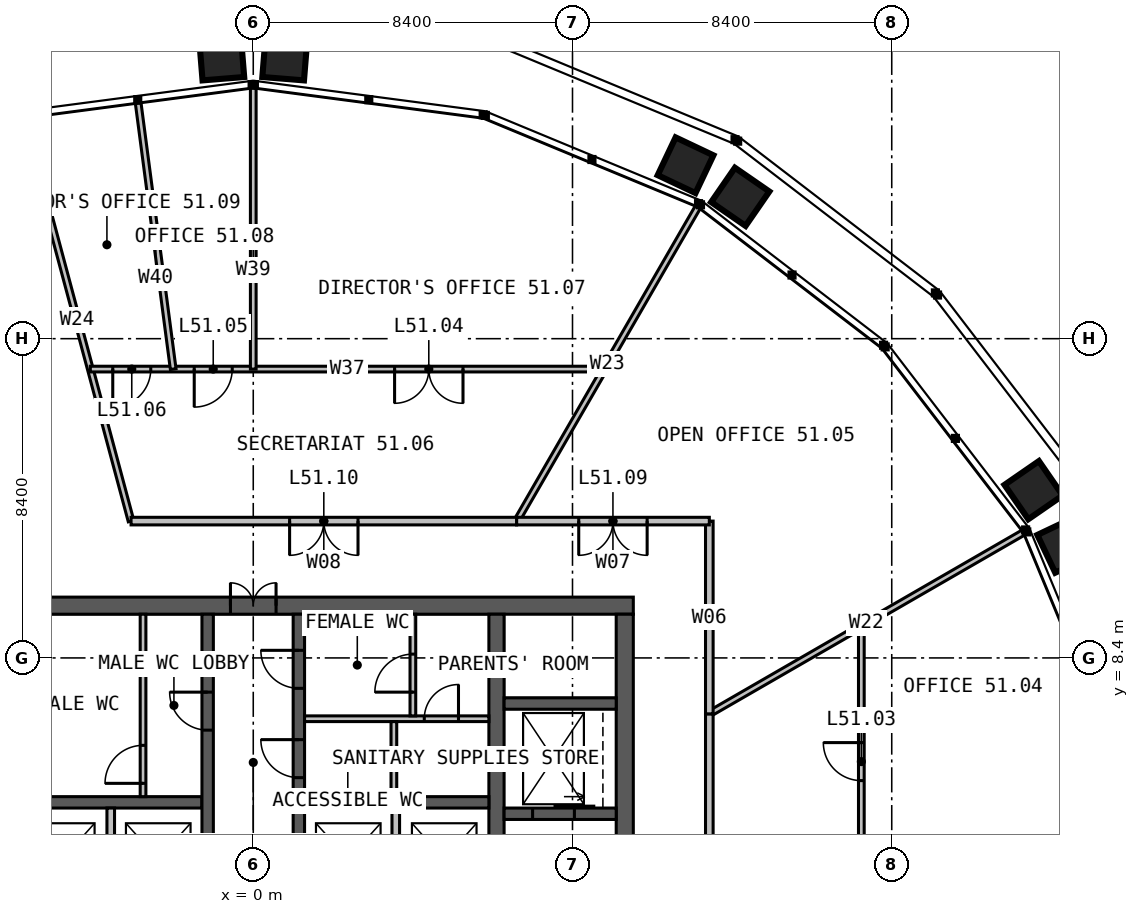
"""IFC4 building model, lengths in metres.
Left out: names, types, materials, properties, quantities, classifications, styles, units other than length and angle.
Written with IfcOpenShell. Run it as: python <this file> out.ifc"""

import sys

from ifc_helpers import new_model, si_unit, direction, frame, frame_2d, origin, place, context, subcontext, project, spatial, rectangle, extrude, element, fill, save


model = new_model("IFC4")
c1 = context("Model", 3, precision=1e-05, world=origin(), true_north=direction((0.0, 1.0)))
c2 = subcontext(c1, "Body", "Model", "MODEL_VIEW")
j1 = project(units=[si_unit("LENGTHUNIT", "METRE"), si_unit("PLANEANGLEUNIT", "RADIAN")], contexts=[c1])
p1 = place(None, origin())
s1 = spatial("IfcSite", under=j1, at=p1, CompositionType="ELEMENT")
p2 = place(p1, origin())
s2 = spatial("IfcBuilding", under=s1, at=p2, CompositionType="ELEMENT")
p3 = place(p2, frame((0.0, 0.0, 211.0)))
s3 = spatial("IfcBuildingStorey", under=s2, at=p3, CompositionType="ELEMENT", Elevation=211.0)
p4 = place(p3, frame((-10.0, 9.775, 0.0), z_axis=(0.0, 0.0, 1.0), x_axis=(1.0, 0.0, 0.0)))
e1 = element("IfcWall", 1, at=p4, inside=s3, PredefinedType="SOLIDWALL", context=c2, shape_type="SweptSolid", body=[
    extrude(rectangle(XDim=20.0, YDim=0.45, at=frame_2d((10.0, 0.0))), origin(), (0.0, 0.0, 1.0), 4.0),
])
p5 = place(p4, frame((9.4, 0.0, 0.0)))
e2 = element("IfcOpeningElement", 2, at=p5, cuts=e1, PredefinedType="OPENING", context=c2, shape_type="SweptSolid", body=[
    extrude(rectangle(XDim=1.2, YDim=2.2, at=frame_2d((0.6, 1.1))), frame((0.0, 0.235, 0.0), z_axis=(0.0, -1.0, 0.0), x_axis=(1.0, 0.0, 0.0)), (0.0, 0.0, 1.0), 0.47),
])
p6 = place(p3, frame((9.775, -9.55, 0.0), z_axis=(0.0, 0.0, 1.0), x_axis=(0.0, 1.0, 0.0)))
e3 = element("IfcWall", 3, at=p6, inside=s3, PredefinedType="SOLIDWALL", context=c2, shape_type="SweptSolid", body=[
    extrude(rectangle(XDim=19.1, YDim=0.45, at=frame_2d((9.55, 0.0))), origin(), (0.0, 0.0, 1.0), 4.0),
])
p7 = place(p3, frame((6.4, 9.55, 0.0), z_axis=(0.0, 0.0, 1.0), x_axis=(0.0, -1.0, 0.0)))
e4 = element("IfcWall", 4, at=p7, inside=s3, PredefinedType="SOLIDWALL", context=c2, shape_type="SweptSolid", body=[
    extrude(rectangle(XDim=19.1, YDim=0.4, at=frame_2d((9.55, 0.0))), origin(), (0.0, 0.0, 1.0), 4.0),
])
p8 = place(p7, frame((9.05, 0.0, 0.0)))
e5 = element("IfcOpeningElement", 5, at=p8, cuts=e4, PredefinedType="OPENING", context=c2, shape_type="SweptSolid", body=[
    extrude(rectangle(XDim=1.0, YDim=2.2, at=frame_2d((0.5, 1.1))), frame((0.0, 0.21, 0.0), z_axis=(0.0, -1.0, 0.0), x_axis=(1.0, 0.0, 0.0)), (0.0, 0.0, 1.0), 0.42),
])
for number, where, z_axis, x_axis in (
    (6, (-6.2, 4.6, 0.0), (0.0, 0.0, 1.0), (1.0, 0.0, 0.0)),
    (7, (1.35, 4.6, 0.0), (0.0, 0.0, 1.0), (1.0, 0.0, 0.0)),
):
    element("IfcWall", number, at=place(p3, frame(where, z_axis=z_axis, x_axis=x_axis)), inside=s3, PredefinedType="SOLIDWALL", context=c2, shape_type="SweptSolid", body=[
        extrude(rectangle(XDim=4.85, YDim=0.3, at=frame_2d((2.425, 0.0))), origin(), (0.0, 0.0, 1.0), 4.0),
    ])
p9 = place(p3, frame((-1.2, 1.45, 0.0), z_axis=(0.0, 0.0, 1.0), x_axis=(0.0, 1.0, 0.0)))
e8 = element("IfcWall", 8, at=p9, inside=s3, PredefinedType="SOLIDWALL", context=c2, shape_type="SweptSolid", body=[
    extrude(rectangle(XDim=8.1, YDim=0.3, at=frame_2d((4.05, 0.0))), origin(), (0.0, 0.0, 1.0), 4.0),
])
p10 = place(p9, frame((5.05, 0.0, 0.0)))
e9 = element("IfcOpeningElement", 9, at=p10, cuts=e8, PredefinedType="OPENING", context=c2, shape_type="SweptSolid", body=[
    extrude(rectangle(XDim=1.0, YDim=2.2, at=frame_2d((0.5, 1.1))), frame((0.0, 0.16, 0.0), z_axis=(0.0, -1.0, 0.0), x_axis=(1.0, 0.0, 0.0)), (0.0, 0.0, 1.0), 0.32),
])
p11 = place(p3, frame((1.2, 1.45, 0.0), z_axis=(0.0, 0.0, 1.0), x_axis=(0.0, 1.0, 0.0)))
e10 = element("IfcWall", 10, at=p11, inside=s3, PredefinedType="SOLIDWALL", context=c2, shape_type="SweptSolid", body=[
    extrude(rectangle(XDim=8.1, YDim=0.3, at=frame_2d((4.05, 0.0))), origin(), (0.0, 0.0, 1.0), 4.0),
])
p12 = place(p11, frame((3.8, 0.0, 0.0)))
e11 = element("IfcOpeningElement", 11, at=p12, cuts=e10, PredefinedType="OPENING", context=c2, shape_type="SweptSolid", body=[
    extrude(rectangle(XDim=1.0, YDim=2.2, at=frame_2d((0.5, 1.1))), frame((0.0, 0.16, 0.0), z_axis=(0.0, -1.0, 0.0), x_axis=(1.0, 0.0, 0.0)), (0.0, 0.0, 1.0), 0.32),
])
p13 = place(p11, frame((6.15, 0.0, 0.0)))
e12 = element("IfcOpeningElement", 12, at=p13, cuts=e10, PredefinedType="OPENING", context=c2, shape_type="SweptSolid", body=[
    extrude(rectangle(XDim=1.0, YDim=2.2, at=frame_2d((0.5, 1.1))), frame((0.0, 0.16, 0.0), z_axis=(0.0, -1.0, 0.0), x_axis=(1.0, 0.0, 0.0)), (0.0, 0.0, 1.0), 0.32),
])
p14 = place(p3, frame((6.6, 4.3, 0.0), z_axis=(0.0, 0.0, 1.0), x_axis=(1.0, 0.0, 0.0)))
e13 = element("IfcWall", 13, at=p14, inside=s3, PredefinedType="SOLIDWALL", context=c2, shape_type="SweptSolid", body=[
    extrude(rectangle(XDim=2.95, YDim=0.3, at=frame_2d((1.475, 0.0))), origin(), (0.0, 0.0, 1.0), 4.0),
])
p15 = place(p14, frame((0.75, 0.0, 0.0)))
e14 = element("IfcOpeningElement", 14, at=p15, cuts=e13, PredefinedType="OPENING", context=c2, shape_type="SweptSolid", body=[
    extrude(rectangle(XDim=1.1, YDim=2.2, at=frame_2d((0.55, 1.1))), frame((0.0, 0.16, 0.0), z_axis=(0.0, -1.0, 0.0), x_axis=(1.0, 0.0, 0.0)), (0.0, 0.0, 1.0), 0.32),
])
p16 = place(p3, frame((6.6, 7.2, 0.0), z_axis=(0.0, 0.0, 1.0), x_axis=(1.0, 0.0, 0.0)))
e15 = element("IfcWall", 15, at=p16, inside=s3, PredefinedType="SOLIDWALL", context=c2, shape_type="SweptSolid", body=[
    extrude(rectangle(XDim=2.95, YDim=0.3, at=frame_2d((1.475, 0.0))), origin(), (0.0, 0.0, 1.0), 4.0),
])
for number, where, z_axis, x_axis in (
    (16, (-3.75, 1.75, 0.0), (0.0, 0.0, 1.0), (0.0, 1.0, 0.0)),
    (17, (3.75, 1.75, 0.0), (0.0, 0.0, 1.0), (0.0, 1.0, 0.0)),
):
    element("IfcWall", number, at=place(p3, frame(where, z_axis=z_axis, x_axis=x_axis)), inside=s3, PredefinedType="SOLIDWALL", context=c2, shape_type="SweptSolid", body=[
        extrude(rectangle(XDim=2.7, YDim=0.2, at=frame_2d((1.35, 0.0))), origin(), (0.0, 0.0, 1.0), 3.75),
    ])
p17 = place(p3, frame((1.35, 6.8, 0.0), z_axis=(0.0, 0.0, 1.0), x_axis=(1.0, 0.0, 0.0)))
e18 = element("IfcWall", 18, at=p17, inside=s3, PredefinedType="PARTITIONING", context=c2, shape_type="SweptSolid", body=[
    extrude(rectangle(XDim=4.85, YDim=0.15, at=frame_2d((2.425, 0.0))), origin(), (0.0, 0.0, 1.0), 3.75),
])
p18 = place(p17, frame((3.15, 0.0, 0.0)))
e19 = element("IfcOpeningElement", 19, at=p18, cuts=e18, PredefinedType="OPENING", context=c2, shape_type="SweptSolid", body=[
    extrude(rectangle(XDim=0.9, YDim=2.2, at=frame_2d((0.45, 1.1))), frame((0.0, 0.085, 0.0), z_axis=(0.0, -1.0, 0.0), x_axis=(1.0, 0.0, 0.0)), (0.0, 0.0, 1.0), 0.17),
])
p19 = place(p3, frame((3.7, 4.75, 0.0), z_axis=(0.0, 0.0, 1.0), x_axis=(0.0, 1.0, 0.0)))
e20 = element("IfcWall", 20, at=p19, inside=s3, PredefinedType="PARTITIONING", context=c2, shape_type="SweptSolid", body=[
    extrude(rectangle(XDim=1.975, YDim=0.15, at=frame_2d((0.988, 0.0))), origin(), (0.0, 0.0, 1.0), 3.75),
])
p20 = place(p3, frame((4.2, 6.875, 0.0), z_axis=(0.0, 0.0, 1.0), x_axis=(0.0, 1.0, 0.0)))
e21 = element("IfcWall", 21, at=p20, inside=s3, PredefinedType="PARTITIONING", context=c2, shape_type="SweptSolid", body=[
    extrude(rectangle(XDim=2.675, YDim=0.15, at=frame_2d((1.337, 0.0))), origin(), (0.0, 0.0, 1.0), 3.75),
])
p21 = place(p20, frame((0.625, 0.0, 0.0)))
e22 = element("IfcOpeningElement", 22, at=p21, cuts=e21, PredefinedType="OPENING", context=c2, shape_type="SweptSolid", body=[
    extrude(rectangle(XDim=1.0, YDim=2.2, at=frame_2d((0.5, 1.1))), frame((0.0, 0.085, 0.0), z_axis=(0.0, -1.0, 0.0), x_axis=(1.0, 0.0, 0.0)), (0.0, 0.0, 1.0), 0.17),
])
p22 = place(p3, frame((-2.9, 4.75, 0.0), z_axis=(0.0, 0.0, 1.0), x_axis=(0.0, 1.0, 0.0)))
e23 = element("IfcWall", 23, at=p22, inside=s3, PredefinedType="PARTITIONING", context=c2, shape_type="SweptSolid", body=[
    extrude(rectangle(XDim=4.8, YDim=0.15, at=frame_2d((2.4, 0.0))), origin(), (0.0, 0.0, 1.0), 3.75),
])
p23 = place(p22, frame((0.35, 0.0, 0.0)))
e24 = element("IfcOpeningElement", 24, at=p23, cuts=e23, PredefinedType="OPENING", context=c2, shape_type="SweptSolid", body=[
    extrude(rectangle(XDim=1.0, YDim=2.2, at=frame_2d((0.5, 1.1))), frame((0.0, 0.085, 0.0), z_axis=(0.0, -1.0, 0.0), x_axis=(1.0, 0.0, 0.0)), (0.0, 0.0, 1.0), 0.17),
])
for number, where, z_axis, x_axis in (
    (25, (12.0, 6.928, 0.0), (0.0, 0.0, 1.0), (0.866, 0.5, 0.0)),
    (26, (6.928, 12.0, 0.0), (0.0, 0.0, 1.0), (0.5, 0.866, 0.0)),
):
    element("IfcWall", number, at=place(p3, frame(where, z_axis=z_axis, x_axis=x_axis)), inside=s3, PredefinedType="PARTITIONING", context=c2, shape_type="SweptSolid", body=[
        extrude(rectangle(XDim=9.541, YDim=0.15, at=frame_2d((4.771, 0.0))), origin(), (0.0, 0.0, 1.0), 2.79),
    ])
p24 = place(p3, frame((-3.215, 12.0, 0.0), z_axis=(0.0, 0.0, 1.0), x_axis=(-0.258822822076, 0.965924814244, 0.0)))
e27 = element("IfcWall", 27, at=p24, inside=s3, PredefinedType="PARTITIONING", context=c2, shape_type="SweptSolid", body=[
    extrude(rectangle(XDim=10.974, YDim=0.15, at=frame_2d((5.487, 0.0))), origin(), (0.0, 0.0, 1.0), 2.79),
])
p25 = place(p3, frame((16.0, -9.238, 0.0), z_axis=(0.0, 0.0, 1.0), x_axis=(0.0, 1.0, 0.0)))
e28 = element("IfcWall", 28, at=p25, inside=s3, PredefinedType="PARTITIONING", context=c2, shape_type="SweptSolid", body=[
    extrude(rectangle(XDim=18.475, YDim=0.15, at=frame_2d((9.238, 0.0))), origin(), (0.0, 0.0, 1.0), 2.79),
])
p26 = place(p25, frame((1.975, 0.0, 0.0)))
e29 = element("IfcOpeningElement", 29, at=p26, cuts=e28, PredefinedType="OPENING", context=c2, shape_type="SweptSolid", body=[
    extrude(rectangle(XDim=1.0, YDim=2.2, at=frame_2d((0.5, 1.1))), frame((0.0, 0.085, 0.0), z_axis=(0.0, -1.0, 0.0), x_axis=(1.0, 0.0, 0.0)), (0.0, 0.0, 1.0), 0.17),
])
p27 = place(p25, frame((7.647, 0.0, 0.0)))
e30 = element("IfcOpeningElement", 30, at=p27, cuts=e28, PredefinedType="OPENING", context=c2, shape_type="SweptSolid", body=[
    extrude(rectangle(XDim=1.0, YDim=2.2, at=frame_2d((0.5, 1.1))), frame((0.0, 0.085, 0.0), z_axis=(0.0, -1.0, 0.0), x_axis=(1.0, 0.0, 0.0)), (0.0, 0.0, 1.0), 0.17),
])
p28 = place(p25, frame((14.41, 0.0, 0.0)))
e31 = element("IfcOpeningElement", 31, at=p28, cuts=e28, PredefinedType="OPENING", context=c2, shape_type="SweptSolid", body=[
    extrude(rectangle(XDim=1.0, YDim=2.2, at=frame_2d((0.5, 1.1))), frame((0.0, 0.085, 0.0), z_axis=(0.0, -1.0, 0.0), x_axis=(1.0, 0.0, 0.0)), (0.0, 0.0, 1.0), 0.17),
])
p29 = place(p3, frame((12.0, -6.928, 0.0), z_axis=(0.0, 0.0, 1.0), x_axis=(0.0, 1.0, 0.0)))
e32 = element("IfcWall", 32, at=p29, inside=s3, PredefinedType="PARTITIONING", context=c2, shape_type="SweptSolid", body=[
    extrude(rectangle(XDim=13.856, YDim=0.2, at=frame_2d((6.928, 0.0))), origin(), (0.0, 0.0, 1.0), 3.8),
])
p30 = place(p29, frame((6.028, 0.0, 0.0)))
e33 = element("IfcOpeningElement", 33, at=p30, cuts=e32, PredefinedType="OPENING", context=c2, shape_type="SweptSolid", body=[
    extrude(rectangle(XDim=1.8, YDim=2.2, at=frame_2d((0.9, 1.1))), frame((0.0, 0.11, 0.0), z_axis=(0.0, -1.0, 0.0), x_axis=(1.0, 0.0, 0.0)), (0.0, 0.0, 1.0), 0.22),
])
p31 = place(p3, frame((12.0, 6.928, 0.0), z_axis=(0.0, 0.0, 1.0), x_axis=(0.0, 1.0, 0.0)))
e34 = element("IfcWall", 34, at=p31, inside=s3, PredefinedType="PARTITIONING", context=c2, shape_type="SweptSolid", body=[
    extrude(rectangle(XDim=5.072, YDim=0.2, at=frame_2d((2.536, 0.0))), origin(), (0.0, 0.0, 1.0), 3.8),
])
p32 = place(p3, frame((12.0, 12.0, 0.0), z_axis=(0.0, 0.0, 1.0), x_axis=(-1.0, 0.0, 0.0)))
e35 = element("IfcWall", 35, at=p32, inside=s3, PredefinedType="PARTITIONING", context=c2, shape_type="SweptSolid", body=[
    extrude(rectangle(XDim=5.072, YDim=0.2, at=frame_2d((2.536, 0.0))), origin(), (0.0, 0.0, 1.0), 3.8),
])
p33 = place(p32, frame((1.636, 0.0, 0.0)))
e36 = element("IfcOpeningElement", 36, at=p33, cuts=e35, PredefinedType="OPENING", context=c2, shape_type="SweptSolid", body=[
    extrude(rectangle(XDim=1.8, YDim=2.2, at=frame_2d((0.9, 1.1))), frame((0.0, 0.11, 0.0), z_axis=(0.0, -1.0, 0.0), x_axis=(1.0, 0.0, 0.0)), (0.0, 0.0, 1.0), 0.22),
])
p34 = place(p3, frame((9.238, 16.0, 0.0), z_axis=(0.0, 0.0, 1.0), x_axis=(-1.0, 0.0, 0.0)))
e37 = element("IfcWall", 37, at=p34, inside=s3, PredefinedType="PARTITIONING", context=c2, shape_type="SweptSolid", body=[
    extrude(rectangle(XDim=13.525, YDim=0.15, at=frame_2d((6.762, 0.0))), origin(), (0.0, 0.0, 1.0), 2.79),
])
p35 = place(p34, frame((3.719, 0.0, 0.0)))
e38 = element("IfcOpeningElement", 38, at=p35, cuts=e37, PredefinedType="OPENING", context=c2, shape_type="SweptSolid", body=[
    extrude(rectangle(XDim=1.8, YDim=2.2, at=frame_2d((0.9, 1.1))), frame((0.0, 0.085, 0.0), z_axis=(0.0, -1.0, 0.0), x_axis=(1.0, 0.0, 0.0)), (0.0, 0.0, 1.0), 0.17),
])
p36 = place(p34, frame((9.791, 0.0, 0.0)))
e39 = element("IfcOpeningElement", 39, at=p36, cuts=e37, PredefinedType="OPENING", context=c2, shape_type="SweptSolid", body=[
    extrude(rectangle(XDim=1.0, YDim=2.2, at=frame_2d((0.5, 1.1))), frame((0.0, 0.085, 0.0), z_axis=(0.0, -1.0, 0.0), x_axis=(1.0, 0.0, 0.0)), (0.0, 0.0, 1.0), 0.17),
])
p37 = place(p34, frame((11.934, 0.0, 0.0)))
e40 = element("IfcOpeningElement", 40, at=p37, cuts=e37, PredefinedType="OPENING", context=c2, shape_type="SweptSolid", body=[
    extrude(rectangle(XDim=1.0, YDim=2.2, at=frame_2d((0.5, 1.1))), frame((0.0, 0.085, 0.0), z_axis=(0.0, -1.0, 0.0), x_axis=(1.0, 0.0, 0.0)), (0.0, 0.0, 1.0), 0.17),
])
p38 = place(p3, frame((0.0, 16.0, 0.0), z_axis=(0.0, 0.0, 1.0), x_axis=(0.0, 1.0, 0.0)))
e41 = element("IfcWall", 41, at=p38, inside=s3, PredefinedType="PARTITIONING", context=c2, shape_type="SweptSolid", body=[
    extrude(rectangle(XDim=7.397, YDim=0.15, at=frame_2d((3.699, 0.0))), origin(), (0.0, 0.0, 1.0), 2.79),
])
p39 = place(p3, frame((-2.106, 16.0, 0.0), z_axis=(0.0, 0.0, 1.0), x_axis=(-0.130527875205, 0.991444639803, 0.0)))
e42 = element("IfcWall", 42, at=p39, inside=s3, PredefinedType="PARTITIONING", context=c2, shape_type="SweptSolid", body=[
    extrude(rectangle(XDim=7.059, YDim=0.15, at=frame_2d((3.529, 0.0))), origin(), (0.0, 0.0, 1.0), 2.79),
])
p40 = place(p3, frame((6.928, 12.0, 0.0), z_axis=(0.0, 0.0, 1.0), x_axis=(-1.0, 0.0, 0.0)))
e43 = element("IfcWall", 43, at=p40, inside=s3, PredefinedType="PARTITIONING", context=c2, shape_type="SweptSolid", body=[
    extrude(rectangle(XDim=10.144, YDim=0.2, at=frame_2d((5.072, 0.0))), origin(), (0.0, 0.0, 1.0), 3.8),
])
p41 = place(p40, frame((4.172, 0.0, 0.0)))
e44 = element("IfcOpeningElement", 44, at=p41, cuts=e43, PredefinedType="OPENING", context=c2, shape_type="SweptSolid", body=[
    extrude(rectangle(XDim=1.8, YDim=2.2, at=frame_2d((0.9, 1.1))), frame((0.0, 0.11, 0.0), z_axis=(0.0, -1.0, 0.0), x_axis=(1.0, 0.0, 0.0)), (0.0, 0.0, 1.0), 0.22),
])
p42 = place(p5, origin())
e45 = element("IfcDoor", 45, at=p42, inside=s3, OperationType="DOUBLE_DOOR_SINGLE_SWING", PredefinedType="DOOR", context=c2, shape_type="SweptSolid", body=[
    extrude(rectangle(XDim=1.2, YDim=2.2, at=frame_2d((0.6, 1.1))), frame((0.0, 0.025, 0.0), z_axis=(0.0, -1.0, 0.0), x_axis=(1.0, 0.0, 0.0)), (0.0, 0.0, 1.0), 0.05),
])
fill(e2, e45)
p43 = place(p10, origin())
e46 = element("IfcDoor", 46, at=p43, inside=s3, OperationType="SINGLE_SWING_RIGHT", PredefinedType="DOOR", context=c2, shape_type="SweptSolid", body=[
    extrude(rectangle(XDim=1.0, YDim=2.2, at=frame_2d((0.5, 1.1))), frame((0.0, 0.025, 0.0), z_axis=(0.0, -1.0, 0.0), x_axis=(1.0, 0.0, 0.0)), (0.0, 0.0, 1.0), 0.05),
])
fill(e9, e46)
p44 = place(p12, origin())
e47 = element("IfcDoor", 47, at=p44, inside=s3, OperationType="SINGLE_SWING_RIGHT", PredefinedType="DOOR", context=c2, shape_type="SweptSolid", body=[
    extrude(rectangle(XDim=1.0, YDim=2.2, at=frame_2d((0.5, 1.1))), frame((0.0, 0.025, 0.0), z_axis=(0.0, -1.0, 0.0), x_axis=(1.0, 0.0, 0.0)), (0.0, 0.0, 1.0), 0.05),
])
fill(e11, e47)
p45 = place(p13, origin())
e48 = element("IfcDoor", 48, at=p45, inside=s3, OperationType="SINGLE_SWING_RIGHT", PredefinedType="DOOR", context=c2, shape_type="SweptSolid", body=[
    extrude(rectangle(XDim=1.0, YDim=2.2, at=frame_2d((0.5, 1.1))), frame((0.0, 0.025, 0.0), z_axis=(0.0, -1.0, 0.0), x_axis=(1.0, 0.0, 0.0)), (0.0, 0.0, 1.0), 0.05),
])
fill(e12, e48)
p46 = place(p18, origin())
e49 = element("IfcDoor", 49, at=p46, inside=s3, OperationType="SINGLE_SWING_RIGHT", PredefinedType="DOOR", context=c2, shape_type="SweptSolid", body=[
    extrude(rectangle(XDim=0.9, YDim=2.2, at=frame_2d((0.45, 1.1))), frame((0.0, 0.025, 0.0), z_axis=(0.0, -1.0, 0.0), x_axis=(1.0, 0.0, 0.0)), (0.0, 0.0, 1.0), 0.05),
])
fill(e19, e49)
p47 = place(p21, origin())
e50 = element("IfcDoor", 50, at=p47, inside=s3, OperationType="SINGLE_SWING_LEFT", PredefinedType="DOOR", context=c2, shape_type="SweptSolid", body=[
    extrude(rectangle(XDim=1.0, YDim=2.2, at=frame_2d((0.5, 1.1))), frame((0.0, 0.025, 0.0), z_axis=(0.0, -1.0, 0.0), x_axis=(1.0, 0.0, 0.0)), (0.0, 0.0, 1.0), 0.05),
])
fill(e22, e50)
p48 = place(p23, origin())
e51 = element("IfcDoor", 51, at=p48, inside=s3, OperationType="SINGLE_SWING_LEFT", PredefinedType="DOOR", context=c2, shape_type="SweptSolid", body=[
    extrude(rectangle(XDim=1.0, YDim=2.2, at=frame_2d((0.5, 1.1))), frame((0.0, 0.025, 0.0), z_axis=(0.0, -1.0, 0.0), x_axis=(1.0, 0.0, 0.0)), (0.0, 0.0, 1.0), 0.05),
])
fill(e24, e51)
p49 = place(p15, origin())
e52 = element("IfcDoor", 52, at=p49, inside=s3, OperationType="SLIDING_TO_LEFT", PredefinedType="DOOR", context=c2, shape_type="SweptSolid", body=[
    extrude(rectangle(XDim=1.1, YDim=2.2, at=frame_2d((0.55, 1.1))), frame((0.0, 0.025, 0.0), z_axis=(0.0, -1.0, 0.0), x_axis=(1.0, 0.0, 0.0)), (0.0, 0.0, 1.0), 0.05),
])
fill(e14, e52)
p50 = place(p28, origin())
e53 = element("IfcDoor", 53, at=p50, inside=s3, OperationType="SINGLE_SWING_RIGHT", PredefinedType="DOOR", context=c2, shape_type="SweptSolid", body=[
    extrude(rectangle(XDim=1.0, YDim=2.2, at=frame_2d((0.5, 1.1))), frame((0.0, 0.025, 0.0), z_axis=(0.0, -1.0, 0.0), x_axis=(1.0, 0.0, 0.0)), (0.0, 0.0, 1.0), 0.05),
])
fill(e31, e53)
p51 = place(p33, origin())
e54 = element("IfcDoor", 54, at=p51, inside=s3, OperationType="DOUBLE_DOOR_SINGLE_SWING", PredefinedType="DOOR", context=c2, shape_type="SweptSolid", body=[
    extrude(rectangle(XDim=1.8, YDim=2.2, at=frame_2d((0.9, 1.1))), frame((0.0, 0.025, 0.0), z_axis=(0.0, -1.0, 0.0), x_axis=(1.0, 0.0, 0.0)), (0.0, 0.0, 1.0), 0.05),
])
fill(e36, e54)
p52 = place(p35, origin())
e55 = element("IfcDoor", 55, at=p52, inside=s3, OperationType="DOUBLE_DOOR_SINGLE_SWING", PredefinedType="DOOR", context=c2, shape_type="SweptSolid", body=[
    extrude(rectangle(XDim=1.8, YDim=2.2, at=frame_2d((0.9, 1.1))), frame((0.0, 0.025, 0.0), z_axis=(0.0, -1.0, 0.0), x_axis=(1.0, 0.0, 0.0)), (0.0, 0.0, 1.0), 0.05),
])
fill(e38, e55)
p53 = place(p36, origin())
e56 = element("IfcDoor", 56, at=p53, inside=s3, OperationType="SINGLE_SWING_RIGHT", PredefinedType="DOOR", context=c2, shape_type="SweptSolid", body=[
    extrude(rectangle(XDim=1.0, YDim=2.2, at=frame_2d((0.5, 1.1))), frame((0.0, 0.025, 0.0), z_axis=(0.0, -1.0, 0.0), x_axis=(1.0, 0.0, 0.0)), (0.0, 0.0, 1.0), 0.05),
])
fill(e39, e56)
p54 = place(p37, origin())
e57 = element("IfcDoor", 57, at=p54, inside=s3, OperationType="SINGLE_SWING_RIGHT", PredefinedType="DOOR", context=c2, shape_type="SweptSolid", body=[
    extrude(rectangle(XDim=1.0, YDim=2.2, at=frame_2d((0.5, 1.1))), frame((0.0, 0.025, 0.0), z_axis=(0.0, -1.0, 0.0), x_axis=(1.0, 0.0, 0.0)), (0.0, 0.0, 1.0), 0.05),
])
fill(e40, e57)
p55 = place(p41, origin())
e58 = element("IfcDoor", 58, at=p55, inside=s3, OperationType="DOUBLE_DOOR_SINGLE_SWING", PredefinedType="DOOR", context=c2, shape_type="SweptSolid", body=[
    extrude(rectangle(XDim=1.8, YDim=2.2, at=frame_2d((0.9, 1.1))), frame((0.0, 0.025, 0.0), z_axis=(0.0, -1.0, 0.0), x_axis=(1.0, 0.0, 0.0)), (0.0, 0.0, 1.0), 0.05),
])
fill(e44, e58)
save(model, sys.argv[1])
